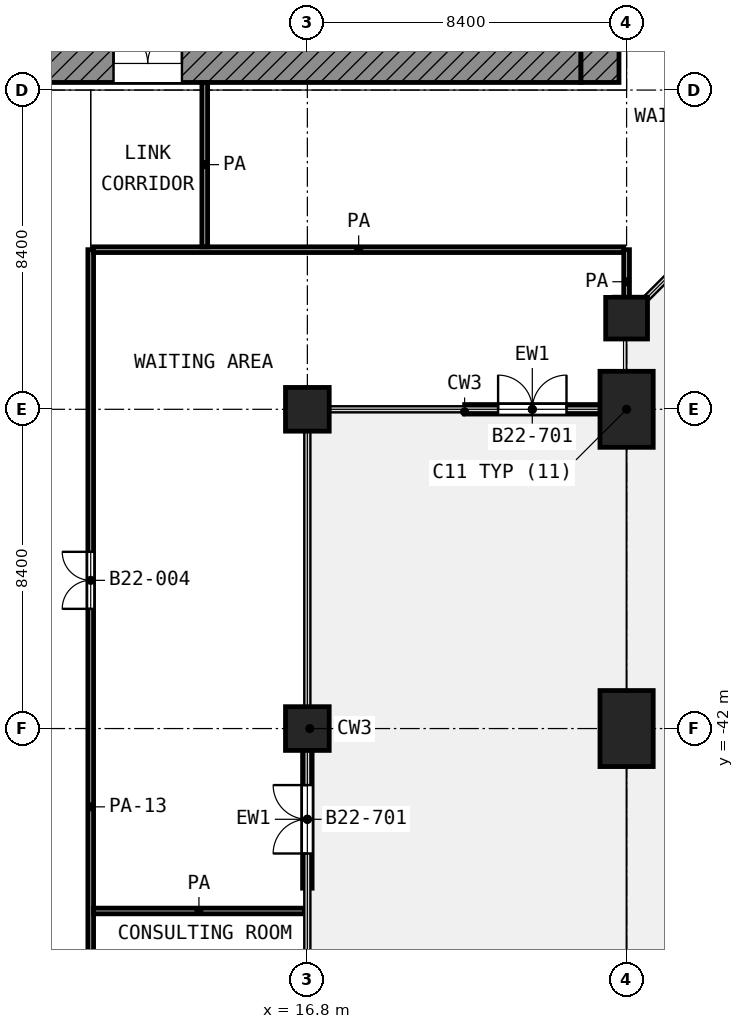
"""IFC4 building model, lengths in metres.
Left out: names, types, materials, properties, quantities, classifications, styles, units other than length and angle.
Written with IfcOpenShell. Run it as: python <this file> out.ifc"""

import sys

from ifc_helpers import new_model, si_unit, direction, frame, frame_2d, origin, origin_2d, place, context, subcontext, project, spatial, rectangle, extrude, element, fill, save


model = new_model("IFC4")
c1 = context("Model", 3, precision=1e-05, world=origin(), true_north=direction((0.0, 1.0)))
c2 = subcontext(c1, "Body", "Model", "MODEL_VIEW")
j1 = project(units=[si_unit("LENGTHUNIT", "METRE"), si_unit("PLANEANGLEUNIT", "RADIAN")], contexts=[c1])
p1 = place(None, origin())
s1 = spatial("IfcSite", under=j1, at=p1, CompositionType="ELEMENT")
p2 = place(p1, origin())
s2 = spatial("IfcBuilding", under=s1, at=p2, CompositionType="ELEMENT")
p3 = place(p2, frame((0.0, 0.0, 98.8)))
s3 = spatial("IfcBuildingStorey", under=s2, at=p3, CompositionType="ELEMENT", Elevation=98.8)
p4 = place(p3, frame((25.2, -31.2, 0.0), z_axis=(0.0, 0.0, 1.0), x_axis=(1.0, 0.0, 0.0)))
e1 = element("IfcColumn", 1, at=p4, inside=s3, PredefinedType="COLUMN", context=c2, shape_type="SweptSolid", body=[
    extrude(rectangle(XDim=1.1, YDim=1.1, at=origin_2d()), origin(), (0.0, 0.0, 1.0), 4.2),
])
for number, where, z_axis, x_axis in (
    (2, (16.8, -33.6, 0.0), (0.0, 0.0, 1.0), (1.0, 0.0, 0.0)),
    (3, (16.8, -42.0, 0.0), (0.0, 0.0, 1.0), (1.0, 0.0, 0.0)),
):
    element("IfcColumn", number, at=place(p3, frame(where, z_axis=z_axis, x_axis=x_axis)), inside=s3, PredefinedType="COLUMN", context=c2, shape_type="SweptSolid", body=[
        extrude(rectangle(XDim=1.15, YDim=1.15, at=origin_2d()), origin(), (0.0, 0.0, 1.0), 4.2),
    ])
for number, where, z_axis, x_axis in (
    (4, (25.2, -42.0, 0.0), (0.0, 0.0, 1.0), (0.0, -1.0, 0.0)),
    (5, (25.2, -33.6, 0.0), (0.0, 0.0, 1.0), (0.0, -1.0, 0.0)),
):
    element("IfcColumn", number, at=place(p3, frame(where, z_axis=z_axis, x_axis=x_axis)), inside=s3, PredefinedType="COLUMN", context=c2, shape_type="SweptSolid", body=[
        extrude(rectangle(XDim=2.0, YDim=1.4, at=origin_2d()), origin(), (0.0, 0.0, 1.0), 4.2),
    ])
p5 = place(p3, frame((16.8, -46.2, 0.0), z_axis=(0.0, 0.0, 1.0), x_axis=(0.0, 1.0, 0.0)))
e6 = element("IfcWall", 6, at=p5, inside=s3, PredefinedType="SOLIDWALL", context=c2, shape_type="SweptSolid", body=[
    extrude(rectangle(XDim=3.625, YDim=0.25, at=frame_2d((1.812, 0.0))), origin(), (0.0, 0.0, 1.0), 3.46),
])
p6 = place(p5, frame((0.913, 0.0, 0.0)))
e7 = element("IfcOpeningElement", 7, at=p6, cuts=e6, PredefinedType="OPENING", context=c2, shape_type="SweptSolid", body=[
    extrude(rectangle(XDim=1.8, YDim=2.1, at=frame_2d((0.9, 1.05))), frame((0.0, 0.135, 0.0), z_axis=(0.0, -1.0, 0.0), x_axis=(1.0, 0.0, 0.0)), (0.0, 0.0, 1.0), 0.27),
])
p7 = place(p3, frame((20.938, -33.6, 0.0), z_axis=(0.0, 0.0, 1.0), x_axis=(1.0, 0.0, 0.0)))
e8 = element("IfcWall", 8, at=p7, inside=s3, PredefinedType="SOLIDWALL", context=c2, shape_type="SweptSolid", body=[
    extrude(rectangle(XDim=3.562, YDim=0.25, at=frame_2d((1.781, 0.0))), origin(), (0.0, 0.0, 1.0), 3.46),
])
p8 = place(p7, frame((0.881, 0.0, 0.0)))
e9 = element("IfcOpeningElement", 9, at=p8, cuts=e8, PredefinedType="OPENING", context=c2, shape_type="SweptSolid", body=[
    extrude(rectangle(XDim=1.8, YDim=2.1, at=frame_2d((0.9, 1.05))), frame((0.0, 0.135, 0.0), z_axis=(0.0, -1.0, 0.0), x_axis=(1.0, 0.0, 0.0)), (0.0, 0.0, 1.0), 0.27),
])
p9 = place(p3, frame((5.4, -24.5, 0.0), z_axis=(0.0, 0.0, 1.0), x_axis=(1.0, 0.0, 0.0)))
e10 = element("IfcWall", 10, at=p9, inside=s3, PredefinedType="SHEAR", context=c2, shape_type="SweptSolid", body=[
    extrude(rectangle(XDim=18.6, YDim=1.0, at=frame_2d((9.3, 0.0))), origin(), (0.0, 0.0, 1.0), 3.6),
])
p10 = place(p9, frame((6.3, 0.0, 0.0)))
e11 = element("IfcOpeningElement", 11, at=p10, cuts=e10, PredefinedType="OPENING", context=c2, shape_type="SweptSolid", body=[
    extrude(rectangle(XDim=1.8, YDim=2.1, at=frame_2d((0.9, 1.05))), frame((0.0, 0.51, 0.0), z_axis=(0.0, -1.0, 0.0), x_axis=(1.0, 0.0, 0.0)), (0.0, 0.0, 1.0), 1.02),
])
p11 = place(p3, frame((24.5, -25.0, 0.0), z_axis=(0.0, 0.0, 1.0), x_axis=(0.0, 1.0, 0.0)))
e12 = element("IfcWall", 12, at=p11, inside=s3, PredefinedType="SHEAR", context=c2, shape_type="SweptSolid", body=[
    extrude(rectangle(XDim=1.0, YDim=1.0, at=frame_2d((0.5, 0.0))), origin(), (0.0, 0.0, 1.0), 3.6),
])
p12 = place(p3, frame((11.175, -46.8, 0.0), z_axis=(0.0, 0.0, 1.0), x_axis=(1.0, 0.0, 0.0)))
e13 = element("IfcWall", 13, at=p12, inside=s3, PredefinedType="PARTITIONING", context=c2, shape_type="SweptSolid", body=[
    extrude(rectangle(XDim=5.545, YDim=0.15, at=frame_2d((2.772, 0.0))), origin(), (0.0, 0.0, 1.0), 3.6),
])
p13 = place(p3, frame((11.175, -29.4, 0.0), z_axis=(0.0, 0.0, 1.0), x_axis=(1.0, 0.0, 0.0)))
e14 = element("IfcWall", 14, at=p13, inside=s3, PredefinedType="PARTITIONING", context=c2, shape_type="SweptSolid", body=[
    extrude(rectangle(XDim=13.95, YDim=0.15, at=frame_2d((6.975, 0.0))), origin(), (0.0, 0.0, 1.0), 3.6),
])
p14 = place(p3, frame((11.1, -58.72, 0.0), z_axis=(0.0, 0.0, 1.0), x_axis=(0.0, 1.0, 0.0)))
e15 = element("IfcWall", 15, at=p14, inside=s3, PredefinedType="PARTITIONING", context=c2, shape_type="SweptSolid", body=[
    extrude(rectangle(XDim=29.32, YDim=0.15, at=frame_2d((14.66, 0.0))), origin(), (0.0, 0.0, 1.0), 2.7),
])
p15 = place(p14, frame((19.87, 0.0, 0.0)))
e16 = element("IfcOpeningElement", 16, at=p15, cuts=e15, PredefinedType="OPENING", context=c2, shape_type="SweptSolid", body=[
    extrude(rectangle(XDim=1.5, YDim=2.1, at=frame_2d((0.75, 1.05))), frame((0.0, 0.085, 0.0), z_axis=(0.0, -1.0, 0.0), x_axis=(1.0, 0.0, 0.0)), (0.0, 0.0, 1.0), 0.17),
])
p16 = place(p14, frame((9.62, 0.0, 0.0)))
e17 = element("IfcOpeningElement", 17, at=p16, cuts=e15, PredefinedType="OPENING", context=c2, shape_type="SweptSolid", body=[
    extrude(rectangle(XDim=1.0, YDim=2.1, at=frame_2d((0.5, 1.05))), frame((0.0, 0.085, 0.0), z_axis=(0.0, -1.0, 0.0), x_axis=(1.0, 0.0, 0.0)), (0.0, 0.0, 1.0), 0.17),
])
p17 = place(p14, frame((3.37, 0.0, 0.0)))
e18 = element("IfcOpeningElement", 18, at=p17, cuts=e15, PredefinedType="OPENING", context=c2, shape_type="SweptSolid", body=[
    extrude(rectangle(XDim=1.5, YDim=2.1, at=frame_2d((0.75, 1.05))), frame((0.0, 0.085, 0.0), z_axis=(0.0, -1.0, 0.0), x_axis=(1.0, 0.0, 0.0)), (0.0, 0.0, 1.0), 0.17),
])
p18 = place(p3, frame((14.1, -29.325, 0.0), z_axis=(0.0, 0.0, 1.0), x_axis=(0.0, 1.0, 0.0)))
e19 = element("IfcWall", 19, at=p18, inside=s3, PredefinedType="PARTITIONING", context=c2, shape_type="SweptSolid", body=[
    extrude(rectangle(XDim=4.325, YDim=0.15, at=frame_2d((2.163, 0.0))), origin(), (0.0, 0.0, 1.0), 3.6),
])
p19 = place(p3, frame((25.2, -31.087, 0.0), z_axis=(0.0, 0.0, 1.0), x_axis=(0.0, 1.0, 0.0)))
e20 = element("IfcWall", 20, at=p19, inside=s3, PredefinedType="PARTITIONING", context=c2, shape_type="SweptSolid", body=[
    extrude(rectangle(XDim=1.687, YDim=0.15, at=frame_2d((0.844, 0.0))), origin(), (0.0, 0.0, 1.0), 3.6),
])
p20 = place(p6, origin())
e21 = element("IfcDoor", 21, at=p20, inside=s3, OperationType="DOUBLE_DOOR_SINGLE_SWING", PredefinedType="DOOR", context=c2, shape_type="SweptSolid", body=[
    extrude(rectangle(XDim=1.8, YDim=2.1, at=frame_2d((0.9, 1.05))), frame((0.0, 0.025, 0.0), z_axis=(0.0, -1.0, 0.0), x_axis=(1.0, 0.0, 0.0)), (0.0, 0.0, 1.0), 0.05),
])
fill(e7, e21)
p21 = place(p8, origin())
e22 = element("IfcDoor", 22, at=p21, inside=s3, OperationType="DOUBLE_DOOR_SINGLE_SWING", PredefinedType="DOOR", context=c2, shape_type="SweptSolid", body=[
    extrude(rectangle(XDim=1.8, YDim=2.1, at=frame_2d((0.9, 1.05))), frame((0.0, 0.025, 0.0), z_axis=(0.0, -1.0, 0.0), x_axis=(1.0, 0.0, 0.0)), (0.0, 0.0, 1.0), 0.05),
])
fill(e9, e22)
p22 = place(p10, origin())
e23 = element("IfcDoor", 23, at=p22, inside=s3, OperationType="DOUBLE_DOOR_SINGLE_SWING", PredefinedType="DOOR", context=c2, shape_type="SweptSolid", body=[
    extrude(rectangle(XDim=1.8, YDim=2.1, at=frame_2d((0.9, 1.05))), frame((0.0, 0.025, 0.0), z_axis=(0.0, -1.0, 0.0), x_axis=(1.0, 0.0, 0.0)), (0.0, 0.0, 1.0), 0.05),
])
fill(e11, e23)
p23 = place(p15, origin())
e24 = element("IfcDoor", 24, at=p23, inside=s3, OperationType="DOUBLE_DOOR_SINGLE_SWING", PredefinedType="DOOR", context=c2, shape_type="SweptSolid", body=[
    extrude(rectangle(XDim=1.5, YDim=2.1, at=frame_2d((0.75, 1.05))), frame((0.0, 0.025, 0.0), z_axis=(0.0, -1.0, 0.0), x_axis=(1.0, 0.0, 0.0)), (0.0, 0.0, 1.0), 0.05),
])
fill(e16, e24)
save(model, sys.argv[1])
